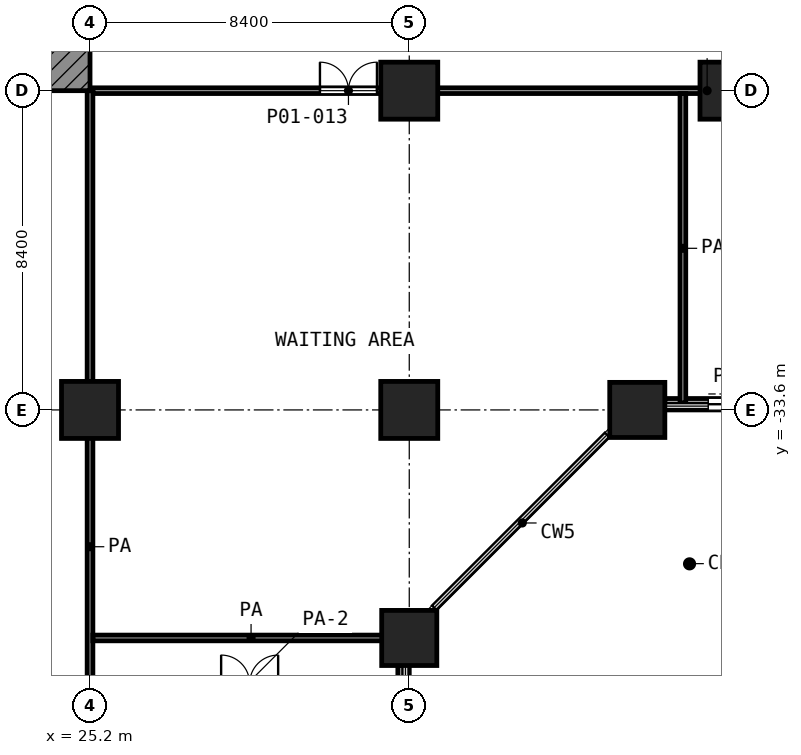
"""IFC4 building model, lengths in metres.
Left out: names, types, materials, properties, quantities, classifications, styles, units other than length and angle.
Written with IfcOpenShell. Run it as: python <this file> out.ifc"""

import sys

from ifc_helpers import new_model, si_unit, direction, frame, frame_2d, origin, origin_2d, place, context, subcontext, project, spatial, rectangle, hollow_circle, extrude, element, fill, save


model = new_model("IFC4")
c1 = context("Model", 3, precision=1e-05, world=origin(), true_north=direction((0.0, 1.0)))
c2 = subcontext(c1, "Body", "Model", "MODEL_VIEW")
j1 = project(units=[si_unit("LENGTHUNIT", "METRE"), si_unit("PLANEANGLEUNIT", "RADIAN")], contexts=[c1])
p1 = place(None, origin())
s1 = spatial("IfcSite", under=j1, at=p1, CompositionType="ELEMENT")
p2 = place(p1, origin())
s2 = spatial("IfcBuilding", under=s1, at=p2, CompositionType="ELEMENT")
p3 = place(p2, origin())
s3 = spatial("IfcBuildingStorey", under=s2, at=p3, CompositionType="ELEMENT", Elevation=0.0)
for number, where, z_axis, x_axis in (
    (1, (33.6, -25.2, 0.0), (0.0, 0.0, 1.0), (1.0, 0.0, 0.0)),
    (2, (42.0, -25.2, 0.0), (0.0, 0.0, 1.0), (1.0, 0.0, 0.0)),
    (3, (25.2, -33.6, 0.0), (0.0, 0.0, 1.0), (1.0, 0.0, 0.0)),
    (4, (33.6, -33.6, 0.0), (0.0, 0.0, 1.0), (1.0, 0.0, 0.0)),
):
    element("IfcColumn", number, at=place(p3, frame(where, z_axis=z_axis, x_axis=x_axis)), inside=s3, PredefinedType="COLUMN", context=c2, shape_type="SweptSolid", body=[
        extrude(rectangle(XDim=1.5, YDim=1.5, at=origin_2d()), origin(), (0.0, 0.0, 1.0), 7.0),
    ])
for number, where, z_axis, x_axis in (
    (5, (39.6, -33.6, 0.0), (0.0, 0.0, 1.0), (1.0, 0.0, 0.0)),
    (6, (33.6, -39.6, 0.0), (0.0, 0.0, 1.0), (1.0, 0.0, 0.0)),
):
    element("IfcColumn", number, at=place(p3, frame(where, z_axis=z_axis, x_axis=x_axis)), inside=s3, PredefinedType="COLUMN", context=c2, shape_type="SweptSolid", body=[
        extrude(rectangle(XDim=1.45, YDim=1.45, at=origin_2d()), origin(), (0.0, 0.0, 1.0), 7.0),
    ])
p4 = place(p3, frame((33.45, -45.012, 0.0), z_axis=(0.0, 0.0, 1.0), x_axis=(0.0, 1.0, 0.0)))
e7 = element("IfcWall", 7, at=p4, inside=s3, PredefinedType="SOLIDWALL", context=c2, shape_type="SweptSolid", body=[
    extrude(rectangle(XDim=4.688, YDim=0.3, at=frame_2d((2.344, 0.0))), origin(), (0.0, 0.0, 1.0), 5.25),
])
p5 = place(p4, frame((1.144, 0.0, 0.0)))
e8 = element("IfcOpeningElement", 8, at=p5, cuts=e7, PredefinedType="OPENING", context=c2, shape_type="SweptSolid", body=[
    extrude(rectangle(XDim=2.4, YDim=2.4, at=frame_2d((1.2, 1.2))), frame((0.0, 0.16, 0.0), z_axis=(0.0, -1.0, 0.0), x_axis=(1.0, 0.0, 0.0)), (0.0, 0.0, 1.0), 0.32),
])
p6 = place(p3, frame((40.325, -33.45, 0.0), z_axis=(0.0, 0.0, 1.0), x_axis=(1.0, 0.0, 0.0)))
e9 = element("IfcWall", 9, at=p6, inside=s3, PredefinedType="SOLIDWALL", context=c2, shape_type="SweptSolid", body=[
    extrude(rectangle(XDim=4.688, YDim=0.3, at=frame_2d((2.344, 0.0))), origin(), (0.0, 0.0, 1.0), 5.25),
])
p7 = place(p6, frame((1.144, 0.0, 0.0)))
e10 = element("IfcOpeningElement", 10, at=p7, cuts=e9, PredefinedType="OPENING", context=c2, shape_type="SweptSolid", body=[
    extrude(rectangle(XDim=2.4, YDim=2.4, at=frame_2d((1.2, 1.2))), frame((0.0, 0.16, 0.0), z_axis=(0.0, -1.0, 0.0), x_axis=(1.0, 0.0, 0.0)), (0.0, 0.0, 1.0), 0.32),
])
p8 = place(p3, frame((40.975, -37.65, 0.0), z_axis=(0.0, 0.0, 1.0), x_axis=(1.0, 0.0, 0.0)))
e11 = element("IfcColumn", 11, at=p8, inside=s3, PredefinedType="COLUMN", context=c2, shape_type="SweptSolid", body=[
    extrude(hollow_circle(Radius=0.11, WallThickness=0.01, at=origin_2d()), origin(), (0.0, 0.0, 1.0), 3.6),
])
p9 = place(p3, frame((24.6, -25.2, 0.0), z_axis=(0.0, 0.0, 1.0), x_axis=(0.0, 1.0, 0.0)))
e12 = element("IfcWall", 12, at=p9, inside=s3, PredefinedType="SHEAR", context=c2, shape_type="SweptSolid", body=[
    extrude(rectangle(XDim=1.2, YDim=1.2, at=frame_2d((0.6, 0.0))), origin(), (0.0, 0.0, 1.0), 6.65),
])
p10 = place(p3, frame((25.275, -39.6, 0.0), z_axis=(0.0, 0.0, 1.0), x_axis=(1.0, 0.0, 0.0)))
e13 = element("IfcWall", 13, at=p10, inside=s3, PredefinedType="PARTITIONING", context=c2, shape_type="SweptSolid", body=[
    extrude(rectangle(XDim=8.325, YDim=0.15, at=frame_2d((4.163, 0.0))), origin(), (0.0, 0.0, 1.0), 6.65),
])
p11 = place(p3, frame((25.275, -25.2, 0.0), z_axis=(0.0, 0.0, 1.0), x_axis=(1.0, 0.0, 0.0)))
e14 = element("IfcWall", 14, at=p11, inside=s3, PredefinedType="PARTITIONING", context=c2, shape_type="SweptSolid", body=[
    extrude(rectangle(XDim=32.325, YDim=0.15, at=frame_2d((16.163, 0.0))), origin(), (0.0, 0.0, 1.0), 6.65),
])
p12 = place(p11, frame((18.975, 0.0, 0.0)))
e15 = element("IfcOpeningElement", 15, at=p12, cuts=e14, PredefinedType="OPENING", context=c2, shape_type="SweptSolid", body=[
    extrude(rectangle(XDim=1.5, YDim=2.1, at=frame_2d((0.75, 1.05))), frame((0.0, 0.085, 0.0), z_axis=(0.0, -1.0, 0.0), x_axis=(1.0, 0.0, 0.0)), (0.0, 0.0, 1.0), 0.17),
])
p13 = place(p11, frame((5.975, 0.0, 0.0)))
e16 = element("IfcOpeningElement", 16, at=p13, cuts=e14, PredefinedType="OPENING", context=c2, shape_type="SweptSolid", body=[
    extrude(rectangle(XDim=1.5, YDim=2.1, at=frame_2d((0.75, 1.05))), frame((0.0, 0.085, 0.0), z_axis=(0.0, -1.0, 0.0), x_axis=(1.0, 0.0, 0.0)), (0.0, 0.0, 1.0), 0.17),
])
p14 = place(p11, frame((27.025, 0.0, 0.0)))
e17 = element("IfcOpeningElement", 17, at=p14, cuts=e14, PredefinedType="OPENING", context=c2, shape_type="SweptSolid", body=[
    extrude(rectangle(XDim=1.0, YDim=2.1, at=frame_2d((0.5, 1.05))), frame((0.0, 0.085, 0.0), z_axis=(0.0, -1.0, 0.0), x_axis=(1.0, 0.0, 0.0)), (0.0, 0.0, 1.0), 0.17),
])
p15 = place(p11, frame((30.625, 0.0, 0.0)))
e18 = element("IfcOpeningElement", 18, at=p15, cuts=e14, PredefinedType="OPENING", context=c2, shape_type="SweptSolid", body=[
    extrude(rectangle(XDim=1.0, YDim=2.1, at=frame_2d((0.5, 1.05))), frame((0.0, 0.085, 0.0), z_axis=(0.0, -1.0, 0.0), x_axis=(1.0, 0.0, 0.0)), (0.0, 0.0, 1.0), 0.17),
])
p16 = place(p3, frame((25.2, -49.199, 0.0), z_axis=(0.0, 0.0, 1.0), x_axis=(0.0, 1.0, 0.0)))
e19 = element("IfcWall", 19, at=p16, inside=s3, PredefinedType="PARTITIONING", context=c2, shape_type="SweptSolid", body=[
    extrude(rectangle(XDim=23.999, YDim=0.15, at=frame_2d((12.0, 0.0))), origin(), (0.0, 0.0, 1.0), 6.65),
])
p17 = place(p16, frame((3.45, 0.0, 0.0)))
e20 = element("IfcOpeningElement", 20, at=p17, cuts=e19, PredefinedType="OPENING", context=c2, shape_type="SweptSolid", body=[
    extrude(rectangle(XDim=1.5, YDim=2.1, at=frame_2d((0.75, 1.05))), frame((0.0, 0.085, 0.0), z_axis=(0.0, -1.0, 0.0), x_axis=(1.0, 0.0, 0.0)), (0.0, 0.0, 1.0), 0.17),
])
p18 = place(p3, frame((40.8, -33.42, 0.0), z_axis=(0.0, 0.0, 1.0), x_axis=(0.0, 1.0, 0.0)))
e21 = element("IfcWall", 21, at=p18, inside=s3, PredefinedType="PARTITIONING", context=c2, shape_type="SweptSolid", body=[
    extrude(rectangle(XDim=8.145, YDim=0.15, at=frame_2d((4.073, 0.0))), origin(), (0.0, 0.0, 1.0), 5.25),
])
p19 = place(p7, origin())
e22 = element("IfcDoor", 22, at=p19, inside=s3, OperationType="DOUBLE_DOOR_SLIDING", PredefinedType="DOOR", context=c2, shape_type="SweptSolid", body=[
    extrude(rectangle(XDim=2.4, YDim=2.4, at=frame_2d((1.2, 1.2))), frame((0.0, 0.025, 0.0), z_axis=(0.0, -1.0, 0.0), x_axis=(1.0, 0.0, 0.0)), (0.0, 0.0, 1.0), 0.05),
])
fill(e10, e22)
p20 = place(p13, origin())
e23 = element("IfcDoor", 23, at=p20, inside=s3, OperationType="DOUBLE_DOOR_SINGLE_SWING", PredefinedType="DOOR", context=c2, shape_type="SweptSolid", body=[
    extrude(rectangle(XDim=1.5, YDim=2.1, at=frame_2d((0.75, 1.05))), frame((0.0, 0.025, 0.0), z_axis=(0.0, -1.0, 0.0), x_axis=(1.0, 0.0, 0.0)), (0.0, 0.0, 1.0), 0.05),
])
fill(e16, e23)
save(model, sys.argv[1])
